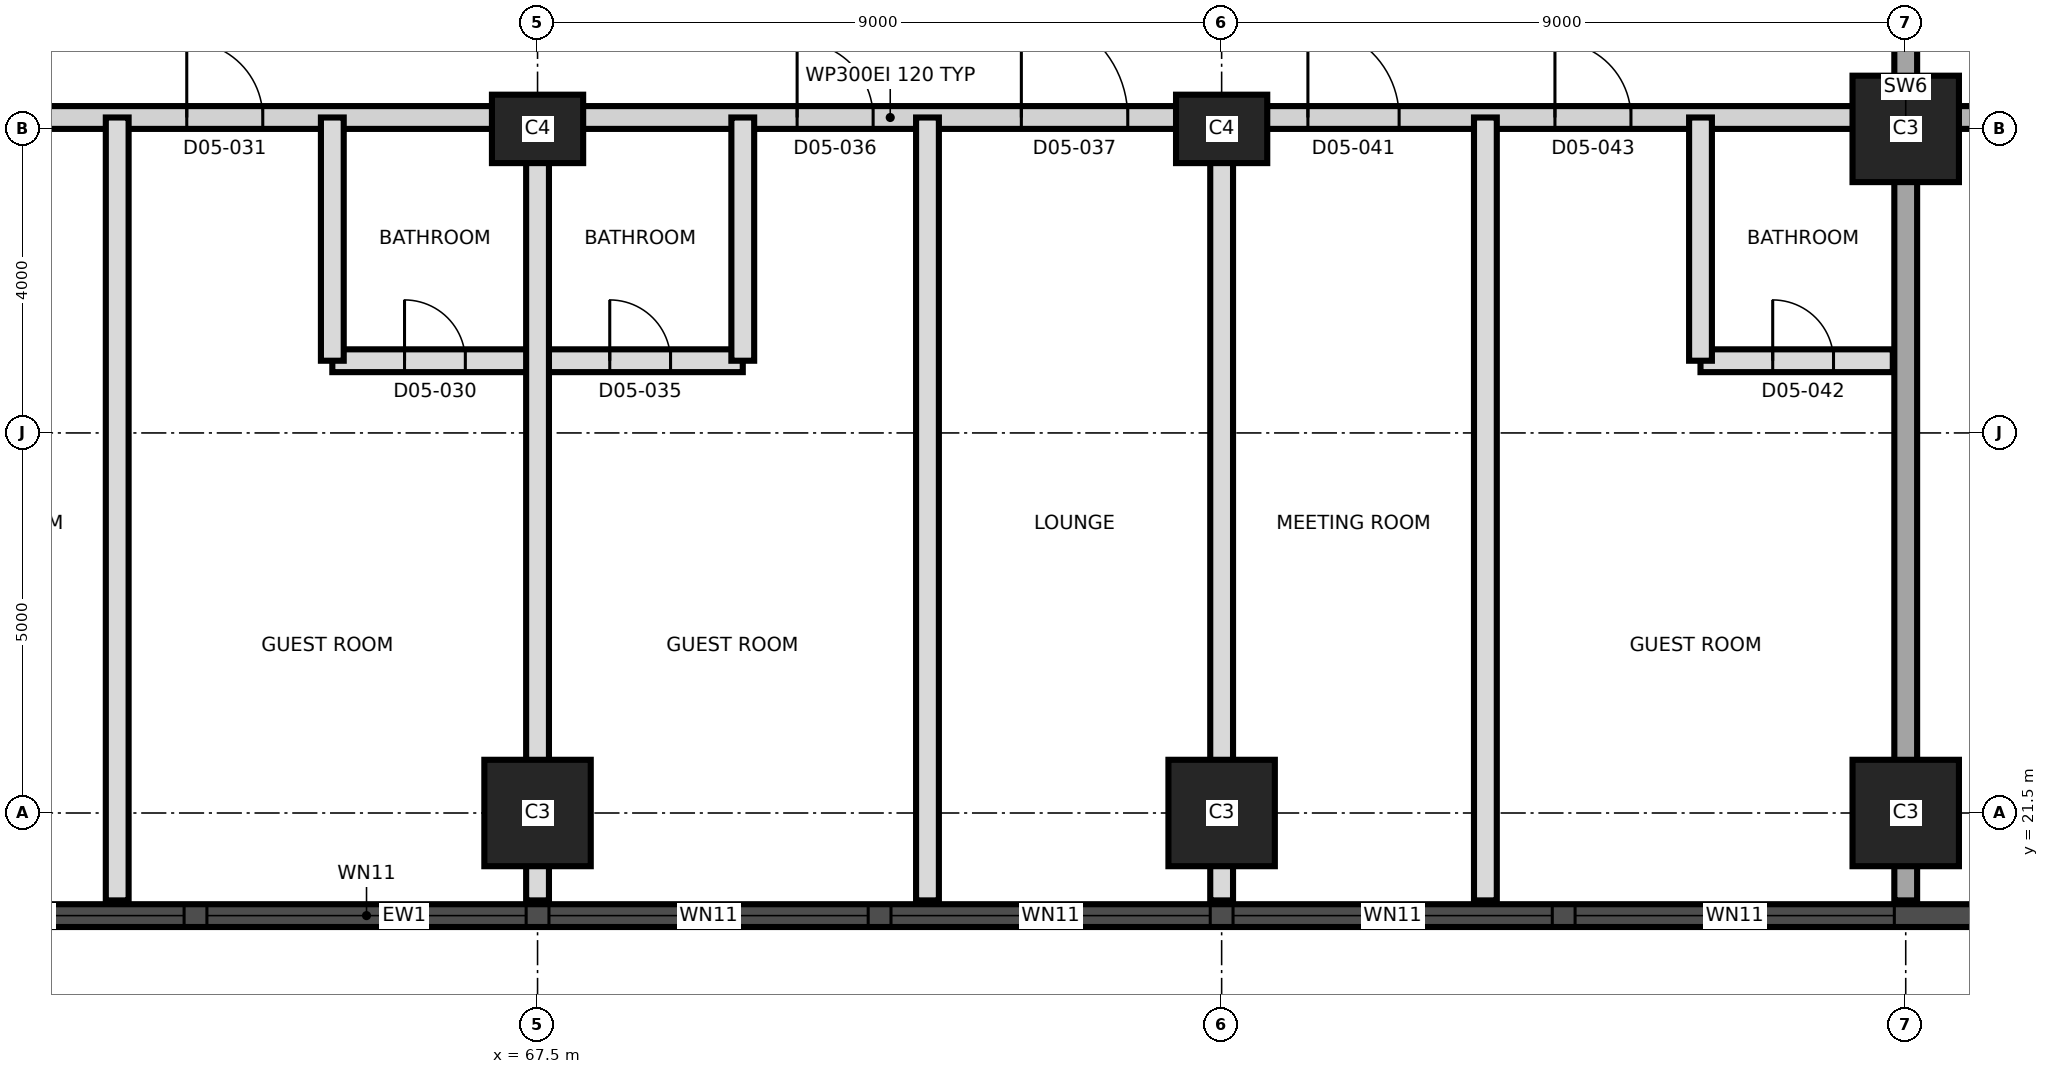
"""IFC4 building model, lengths in metres.
Left out: names, types, materials, properties, quantities, classifications, styles, units other than length and angle.
Written with IfcOpenShell. Run it as: python <this file> out.ifc"""

import sys

from ifc_helpers import new_model, si_unit, direction, frame, frame_2d, origin, origin_2d, place, context, subcontext, project, spatial, rectangle, extrude, element, fill, save


model = new_model("IFC4")
c1 = context("Model", 3, precision=1e-05, world=origin(), true_north=direction((0.0, 1.0)))
c2 = subcontext(c1, "Body", "Model", "MODEL_VIEW")
j1 = project(units=[si_unit("LENGTHUNIT", "METRE"), si_unit("PLANEANGLEUNIT", "RADIAN")], contexts=[c1])
p1 = place(None, origin())
s1 = spatial("IfcSite", under=j1, at=p1, CompositionType="ELEMENT")
p2 = place(p1, origin())
s2 = spatial("IfcBuilding", under=s1, at=p2, CompositionType="ELEMENT")
p3 = place(p2, frame((0.0, 0.0, 70.5)))
s3 = spatial("IfcBuildingStorey", under=s2, at=p3, CompositionType="ELEMENT", Elevation=70.5)
for number, where, z_axis, x_axis in (
    (1, (67.5, 21.5, 0.0), (0.0, 0.0, 1.0), (1.0, 0.0, 0.0)),
    (2, (76.5, 21.5, 0.0), (0.0, 0.0, 1.0), (1.0, 0.0, 0.0)),
    (3, (85.5, 21.5, 0.0), (0.0, 0.0, 1.0), (1.0, 0.0, 0.0)),
):
    element("IfcColumn", number, at=place(p3, frame(where, z_axis=z_axis, x_axis=x_axis)), inside=s3, PredefinedType="COLUMN", context=c2, shape_type="SweptSolid", body=[
        extrude(rectangle(XDim=1.4, YDim=1.4, at=origin_2d()), origin(), (0.0, 0.0, 1.0), 3.7),
    ])
for number, where, z_axis, x_axis in (
    (4, (67.5, 30.5, 0.0), (0.0, 0.0, 1.0), (1.0, 0.0, 0.0)),
    (5, (76.5, 30.5, 0.0), (0.0, 0.0, 1.0), (1.0, 0.0, 0.0)),
):
    element("IfcColumn", number, at=place(p3, frame(where, z_axis=z_axis, x_axis=x_axis)), inside=s3, PredefinedType="COLUMN", context=c2, shape_type="SweptSolid", body=[
        extrude(rectangle(XDim=1.2, YDim=0.9, at=origin_2d()), origin(), (0.0, 0.0, 1.0), 3.7),
    ])
p4 = place(p3, frame((85.5, 30.5, 0.0), z_axis=(0.0, 0.0, 1.0), x_axis=(1.0, 0.0, 0.0)))
e6 = element("IfcColumn", 6, at=p4, inside=s3, PredefinedType="COLUMN", context=c2, shape_type="SweptSolid", body=[
    extrude(rectangle(XDim=1.4, YDim=1.4, at=origin_2d()), origin(), (0.0, 0.0, 1.0), 3.7),
])
p5 = place(p3, frame((85.5, 20.35, 0.0), z_axis=(0.0, 0.0, 1.0), x_axis=(0.0, 1.0, 0.0)))
e7 = element("IfcWall", 7, at=p5, inside=s3, PredefinedType="SHEAR", context=c2, shape_type="SweptSolid", body=[
    extrude(rectangle(XDim=20.3, YDim=0.3, at=frame_2d((10.15, 0.0))), origin(), (0.0, 0.0, 1.0), 3.7),
])
p6 = place(p5, frame((11.35, 0.0, 0.0)))
e8 = element("IfcOpeningElement", 8, at=p6, cuts=e7, PredefinedType="OPENING", context=c2, shape_type="SweptSolid", body=[
    extrude(rectangle(XDim=1.4, YDim=2.1, at=frame_2d((0.7, 1.05))), frame((0.0, 0.16, 0.0), z_axis=(0.0, -1.0, 0.0), x_axis=(1.0, 0.0, 0.0)), (0.0, 0.0, 1.0), 0.32),
])
p7 = place(p3, frame((44.011, 20.15, 0.0), z_axis=(0.0, 0.0, 1.0), x_axis=(1.0, 0.0, 0.0)))
e9 = element("IfcWall", 9, at=p7, inside=s3, PredefinedType="SOLIDWALL", context=c2, shape_type="SweptSolid", body=[
    extrude(rectangle(XDim=43.476, YDim=0.3, at=frame_2d((21.738, 0.0))), origin(), (0.0, 0.0, 1.0), 3.4),
])
p8 = place(p7, frame((1.845, 0.0, 0.3)))
e10 = element("IfcOpeningElement", 10, at=p8, cuts=e9, PredefinedType="OPENING", context=c2, shape_type="SweptSolid", body=[
    extrude(rectangle(XDim=1.8, YDim=2.4, at=frame_2d((0.9, 1.2))), frame((0.0, 0.16, 0.0), z_axis=(0.0, -1.0, 0.0), x_axis=(1.0, 0.0, 0.0)), (0.0, 0.0, 1.0), 0.32),
])
p9 = place(p7, frame((5.639, 0.0, 0.9)))
e11 = element("IfcOpeningElement", 11, at=p9, cuts=e9, PredefinedType="OPENING", context=c2, shape_type="SweptSolid", body=[
    extrude(rectangle(XDim=4.2, YDim=1.5, at=frame_2d((2.1, 0.75))), frame((0.0, 0.16, 0.0), z_axis=(0.0, -1.0, 0.0), x_axis=(1.0, 0.0, 0.0)), (0.0, 0.0, 1.0), 0.32),
])
p10 = place(p7, frame((10.139, 0.0, 0.9)))
e12 = element("IfcOpeningElement", 12, at=p10, cuts=e9, PredefinedType="OPENING", context=c2, shape_type="SweptSolid", body=[
    extrude(rectangle(XDim=4.2, YDim=1.5, at=frame_2d((2.1, 0.75))), frame((0.0, 0.16, 0.0), z_axis=(0.0, -1.0, 0.0), x_axis=(1.0, 0.0, 0.0)), (0.0, 0.0, 1.0), 0.32),
])
p11 = place(p7, frame((14.639, 0.0, 0.9)))
e13 = element("IfcOpeningElement", 13, at=p11, cuts=e9, PredefinedType="OPENING", context=c2, shape_type="SweptSolid", body=[
    extrude(rectangle(XDim=4.2, YDim=1.5, at=frame_2d((2.1, 0.75))), frame((0.0, 0.16, 0.0), z_axis=(0.0, -1.0, 0.0), x_axis=(1.0, 0.0, 0.0)), (0.0, 0.0, 1.0), 0.32),
])
p12 = place(p7, frame((19.139, 0.0, 0.9)))
e14 = element("IfcOpeningElement", 14, at=p12, cuts=e9, PredefinedType="OPENING", context=c2, shape_type="SweptSolid", body=[
    extrude(rectangle(XDim=4.2, YDim=1.5, at=frame_2d((2.1, 0.75))), frame((0.0, 0.16, 0.0), z_axis=(0.0, -1.0, 0.0), x_axis=(1.0, 0.0, 0.0)), (0.0, 0.0, 1.0), 0.32),
])
p13 = place(p7, frame((23.639, 0.0, 0.9)))
e15 = element("IfcOpeningElement", 15, at=p13, cuts=e9, PredefinedType="OPENING", context=c2, shape_type="SweptSolid", body=[
    extrude(rectangle(XDim=4.2, YDim=1.5, at=frame_2d((2.1, 0.75))), frame((0.0, 0.16, 0.0), z_axis=(0.0, -1.0, 0.0), x_axis=(1.0, 0.0, 0.0)), (0.0, 0.0, 1.0), 0.32),
])
p14 = place(p7, frame((28.139, 0.0, 0.9)))
e16 = element("IfcOpeningElement", 16, at=p14, cuts=e9, PredefinedType="OPENING", context=c2, shape_type="SweptSolid", body=[
    extrude(rectangle(XDim=4.2, YDim=1.5, at=frame_2d((2.1, 0.75))), frame((0.0, 0.16, 0.0), z_axis=(0.0, -1.0, 0.0), x_axis=(1.0, 0.0, 0.0)), (0.0, 0.0, 1.0), 0.32),
])
p15 = place(p7, frame((32.639, 0.0, 0.9)))
e17 = element("IfcOpeningElement", 17, at=p15, cuts=e9, PredefinedType="OPENING", context=c2, shape_type="SweptSolid", body=[
    extrude(rectangle(XDim=4.2, YDim=1.5, at=frame_2d((2.1, 0.75))), frame((0.0, 0.16, 0.0), z_axis=(0.0, -1.0, 0.0), x_axis=(1.0, 0.0, 0.0)), (0.0, 0.0, 1.0), 0.32),
])
p16 = place(p7, frame((37.139, 0.0, 0.9)))
e18 = element("IfcOpeningElement", 18, at=p16, cuts=e9, PredefinedType="OPENING", context=c2, shape_type="SweptSolid", body=[
    extrude(rectangle(XDim=4.2, YDim=1.5, at=frame_2d((2.1, 0.75))), frame((0.0, 0.16, 0.0), z_axis=(0.0, -1.0, 0.0), x_axis=(1.0, 0.0, 0.0)), (0.0, 0.0, 1.0), 0.32),
])
p17 = place(p3, frame((64.8, 27.45, 0.0), z_axis=(0.0, 0.0, 1.0), x_axis=(1.0, 0.0, 0.0)))
e19 = element("IfcWall", 19, at=p17, inside=s3, PredefinedType="PARTITIONING", context=c2, shape_type="SweptSolid", body=[
    extrude(rectangle(XDim=5.4, YDim=0.3, at=frame_2d((2.7, 0.0))), origin(), (0.0, 0.0, 1.0), 3.4),
])
p18 = place(p17, frame((0.95, 0.0, 0.0)))
e20 = element("IfcOpeningElement", 20, at=p18, cuts=e19, PredefinedType="OPENING", context=c2, shape_type="SweptSolid", body=[
    extrude(rectangle(XDim=0.8, YDim=2.1, at=frame_2d((0.4, 1.05))), frame((0.0, 0.16, 0.0), z_axis=(0.0, -1.0, 0.0), x_axis=(1.0, 0.0, 0.0)), (0.0, 0.0, 1.0), 0.32),
])
p19 = place(p17, frame((3.65, 0.0, 0.0)))
e21 = element("IfcOpeningElement", 21, at=p19, cuts=e19, PredefinedType="OPENING", context=c2, shape_type="SweptSolid", body=[
    extrude(rectangle(XDim=0.8, YDim=2.1, at=frame_2d((0.4, 1.05))), frame((0.0, 0.16, 0.0), z_axis=(0.0, -1.0, 0.0), x_axis=(1.0, 0.0, 0.0)), (0.0, 0.0, 1.0), 0.32),
])
p20 = place(p3, frame((82.8, 27.45, 0.0), z_axis=(0.0, 0.0, 1.0), x_axis=(1.0, 0.0, 0.0)))
e22 = element("IfcWall", 22, at=p20, inside=s3, PredefinedType="PARTITIONING", context=c2, shape_type="SweptSolid", body=[
    extrude(rectangle(XDim=2.53, YDim=0.3, at=frame_2d((1.265, 0.0))), origin(), (0.0, 0.0, 1.0), 3.4),
])
p21 = place(p20, frame((0.95, 0.0, 0.0)))
e23 = element("IfcOpeningElement", 23, at=p21, cuts=e22, PredefinedType="OPENING", context=c2, shape_type="SweptSolid", body=[
    extrude(rectangle(XDim=0.8, YDim=2.1, at=frame_2d((0.4, 1.05))), frame((0.0, 0.16, 0.0), z_axis=(0.0, -1.0, 0.0), x_axis=(1.0, 0.0, 0.0)), (0.0, 0.0, 1.0), 0.32),
])
p22 = place(p3, frame((58.95, 30.65, 0.0), z_axis=(0.0, 0.0, 1.0), x_axis=(1.0, 0.0, 0.0)))
e24 = element("IfcWall", 24, at=p22, inside=s3, PredefinedType="PARTITIONING", context=c2, shape_type="SweptSolid", body=[
    extrude(rectangle(XDim=26.38, YDim=0.3, at=frame_2d((13.19, 0.0))), origin(), (0.0, 0.0, 1.0), 3.4),
])
p23 = place(p22, frame((0.685, 0.0, 0.0)))
e25 = element("IfcOpeningElement", 25, at=p23, cuts=e24, PredefinedType="OPENING", context=c2, shape_type="SweptSolid", body=[
    extrude(rectangle(XDim=1.2, YDim=2.1, at=frame_2d((0.6, 1.05))), frame((0.0, 0.16, 0.0), z_axis=(0.0, -1.0, 0.0), x_axis=(1.0, 0.0, 0.0)), (0.0, 0.0, 1.0), 0.32),
])
p24 = place(p22, frame((3.935, 0.0, 0.0)))
e26 = element("IfcOpeningElement", 26, at=p24, cuts=e24, PredefinedType="OPENING", context=c2, shape_type="SweptSolid", body=[
    extrude(rectangle(XDim=1.0, YDim=2.1, at=frame_2d((0.5, 1.05))), frame((0.0, 0.16, 0.0), z_axis=(0.0, -1.0, 0.0), x_axis=(1.0, 0.0, 0.0)), (0.0, 0.0, 1.0), 0.32),
])
p25 = place(p22, frame((11.965, 0.0, 0.0)))
e27 = element("IfcOpeningElement", 27, at=p25, cuts=e24, PredefinedType="OPENING", context=c2, shape_type="SweptSolid", body=[
    extrude(rectangle(XDim=1.0, YDim=2.1, at=frame_2d((0.5, 1.05))), frame((0.0, 0.16, 0.0), z_axis=(0.0, -1.0, 0.0), x_axis=(1.0, 0.0, 0.0)), (0.0, 0.0, 1.0), 0.32),
])
p26 = place(p22, frame((14.915, 0.0, 0.0)))
e28 = element("IfcOpeningElement", 28, at=p26, cuts=e24, PredefinedType="OPENING", context=c2, shape_type="SweptSolid", body=[
    extrude(rectangle(XDim=1.4, YDim=2.1, at=frame_2d((0.7, 1.05))), frame((0.0, 0.16, 0.0), z_axis=(0.0, -1.0, 0.0), x_axis=(1.0, 0.0, 0.0)), (0.0, 0.0, 1.0), 0.32),
])
p27 = place(p22, frame((18.685, 0.0, 0.0)))
e29 = element("IfcOpeningElement", 29, at=p27, cuts=e24, PredefinedType="OPENING", context=c2, shape_type="SweptSolid", body=[
    extrude(rectangle(XDim=1.2, YDim=2.1, at=frame_2d((0.6, 1.05))), frame((0.0, 0.16, 0.0), z_axis=(0.0, -1.0, 0.0), x_axis=(1.0, 0.0, 0.0)), (0.0, 0.0, 1.0), 0.32),
])
p28 = place(p22, frame((21.935, 0.0, 0.0)))
e30 = element("IfcOpeningElement", 30, at=p28, cuts=e24, PredefinedType="OPENING", context=c2, shape_type="SweptSolid", body=[
    extrude(rectangle(XDim=1.0, YDim=2.1, at=frame_2d((0.5, 1.05))), frame((0.0, 0.16, 0.0), z_axis=(0.0, -1.0, 0.0), x_axis=(1.0, 0.0, 0.0)), (0.0, 0.0, 1.0), 0.32),
])
p29 = place(p3, frame((85.67, 30.65, 0.0), z_axis=(0.0, 0.0, 1.0), x_axis=(1.0, 0.0, 0.0)))
e31 = element("IfcWall", 31, at=p29, inside=s3, PredefinedType="SHEAR", context=c2, shape_type="SweptSolid", body=[
    extrude(rectangle(XDim=9.58, YDim=0.3, at=frame_2d((4.79, 0.0))), origin(), (0.0, 0.0, 1.0), 3.4),
])
p30 = place(p29, frame((2.08, 0.0, 0.0)))
e32 = element("IfcOpeningElement", 32, at=p30, cuts=e31, PredefinedType="OPENING", context=c2, shape_type="SweptSolid", body=[
    extrude(rectangle(XDim=1.2, YDim=2.1, at=frame_2d((0.6, 1.05))), frame((0.0, 0.16, 0.0), z_axis=(0.0, -1.0, 0.0), x_axis=(1.0, 0.0, 0.0)), (0.0, 0.0, 1.0), 0.32),
])
p31 = place(p29, frame((5.63, 0.0, 0.0)))
e33 = element("IfcOpeningElement", 33, at=p31, cuts=e31, PredefinedType="OPENING", context=c2, shape_type="SweptSolid", body=[
    extrude(rectangle(XDim=1.0, YDim=2.1, at=frame_2d((0.5, 1.05))), frame((0.0, 0.16, 0.0), z_axis=(0.0, -1.0, 0.0), x_axis=(1.0, 0.0, 0.0)), (0.0, 0.0, 1.0), 0.32),
])
p32 = place(p3, frame((61.97, 20.35, 0.0), z_axis=(0.0, 0.0, 1.0), x_axis=(0.0, 1.0, 0.0)))
e34 = element("IfcWall", 34, at=p32, inside=s3, PredefinedType="PARTITIONING", context=c2, shape_type="SweptSolid", body=[
    extrude(rectangle(XDim=10.3, YDim=0.3, at=frame_2d((5.15, 0.0))), origin(), (0.0, 0.0, 1.0), 3.4),
])
p33 = place(p3, frame((64.8, 27.45, 0.0), z_axis=(0.0, 0.0, 1.0), x_axis=(0.0, 1.0, 0.0)))
e35 = element("IfcWall", 35, at=p33, inside=s3, PredefinedType="PARTITIONING", context=c2, shape_type="SweptSolid", body=[
    extrude(rectangle(XDim=3.2, YDim=0.3, at=frame_2d((1.6, 0.0))), origin(), (0.0, 0.0, 1.0), 3.4),
])
p34 = place(p3, frame((67.5, 20.35, 0.0), z_axis=(0.0, 0.0, 1.0), x_axis=(0.0, 1.0, 0.0)))
e36 = element("IfcWall", 36, at=p34, inside=s3, PredefinedType="PARTITIONING", context=c2, shape_type="SweptSolid", body=[
    extrude(rectangle(XDim=10.3, YDim=0.3, at=frame_2d((5.15, 0.0))), origin(), (0.0, 0.0, 1.0), 3.4),
])
p35 = place(p3, frame((70.2, 27.45, 0.0), z_axis=(0.0, 0.0, 1.0), x_axis=(0.0, 1.0, 0.0)))
e37 = element("IfcWall", 37, at=p35, inside=s3, PredefinedType="PARTITIONING", context=c2, shape_type="SweptSolid", body=[
    extrude(rectangle(XDim=3.2, YDim=0.3, at=frame_2d((1.6, 0.0))), origin(), (0.0, 0.0, 1.0), 3.4),
])
for number, where, z_axis, x_axis in (
    (38, (72.63, 20.35, 0.0), (0.0, 0.0, 1.0), (0.0, 1.0, 0.0)),
    (39, (76.5, 20.35, 0.0), (0.0, 0.0, 1.0), (0.0, 1.0, 0.0)),
    (40, (79.97, 20.35, 0.0), (0.0, 0.0, 1.0), (0.0, 1.0, 0.0)),
):
    element("IfcWall", number, at=place(p3, frame(where, z_axis=z_axis, x_axis=x_axis)), inside=s3, PredefinedType="PARTITIONING", context=c2, shape_type="SweptSolid", body=[
        extrude(rectangle(XDim=10.3, YDim=0.3, at=frame_2d((5.15, 0.0))), origin(), (0.0, 0.0, 1.0), 3.4),
    ])
p36 = place(p3, frame((82.8, 27.45, 0.0), z_axis=(0.0, 0.0, 1.0), x_axis=(0.0, 1.0, 0.0)))
e41 = element("IfcWall", 41, at=p36, inside=s3, PredefinedType="PARTITIONING", context=c2, shape_type="SweptSolid", body=[
    extrude(rectangle(XDim=3.2, YDim=0.3, at=frame_2d((1.6, 0.0))), origin(), (0.0, 0.0, 1.0), 3.4),
])
p37 = place(p11, origin())
e42 = element("IfcWindow", 42, at=p37, inside=s3, PartitioningType="SINGLE_PANEL", PredefinedType="WINDOW", context=c2, shape_type="SweptSolid", body=[
    extrude(rectangle(XDim=4.2, YDim=1.5, at=frame_2d((2.1, 0.75))), frame((0.0, 0.03, 0.0), z_axis=(0.0, -1.0, 0.0), x_axis=(1.0, 0.0, 0.0)), (0.0, 0.0, 1.0), 0.06),
])
fill(e13, e42)
p38 = place(p12, origin())
e43 = element("IfcWindow", 43, at=p38, inside=s3, PartitioningType="SINGLE_PANEL", PredefinedType="WINDOW", context=c2, shape_type="SweptSolid", body=[
    extrude(rectangle(XDim=4.2, YDim=1.5, at=frame_2d((2.1, 0.75))), frame((0.0, 0.03, 0.0), z_axis=(0.0, -1.0, 0.0), x_axis=(1.0, 0.0, 0.0)), (0.0, 0.0, 1.0), 0.06),
])
fill(e14, e43)
p39 = place(p13, origin())
e44 = element("IfcWindow", 44, at=p39, inside=s3, PartitioningType="SINGLE_PANEL", PredefinedType="WINDOW", context=c2, shape_type="SweptSolid", body=[
    extrude(rectangle(XDim=4.2, YDim=1.5, at=frame_2d((2.1, 0.75))), frame((0.0, 0.03, 0.0), z_axis=(0.0, -1.0, 0.0), x_axis=(1.0, 0.0, 0.0)), (0.0, 0.0, 1.0), 0.06),
])
fill(e15, e44)
p40 = place(p14, origin())
e45 = element("IfcWindow", 45, at=p40, inside=s3, PartitioningType="SINGLE_PANEL", PredefinedType="WINDOW", context=c2, shape_type="SweptSolid", body=[
    extrude(rectangle(XDim=4.2, YDim=1.5, at=frame_2d((2.1, 0.75))), frame((0.0, 0.03, 0.0), z_axis=(0.0, -1.0, 0.0), x_axis=(1.0, 0.0, 0.0)), (0.0, 0.0, 1.0), 0.06),
])
fill(e16, e45)
p41 = place(p15, origin())
e46 = element("IfcWindow", 46, at=p41, inside=s3, PartitioningType="SINGLE_PANEL", PredefinedType="WINDOW", context=c2, shape_type="SweptSolid", body=[
    extrude(rectangle(XDim=4.2, YDim=1.5, at=frame_2d((2.1, 0.75))), frame((0.0, 0.03, 0.0), z_axis=(0.0, -1.0, 0.0), x_axis=(1.0, 0.0, 0.0)), (0.0, 0.0, 1.0), 0.06),
])
fill(e17, e46)
p42 = place(p16, origin())
e47 = element("IfcWindow", 47, at=p42, inside=s3, PartitioningType="SINGLE_PANEL", PredefinedType="WINDOW", context=c2, shape_type="SweptSolid", body=[
    extrude(rectangle(XDim=4.2, YDim=1.5, at=frame_2d((2.1, 0.75))), frame((0.0, 0.03, 0.0), z_axis=(0.0, -1.0, 0.0), x_axis=(1.0, 0.0, 0.0)), (0.0, 0.0, 1.0), 0.06),
])
fill(e18, e47)
p43 = place(p18, origin())
e48 = element("IfcDoor", 48, at=p43, inside=s3, OperationType="SINGLE_SWING_RIGHT", PredefinedType="DOOR", context=c2, shape_type="SweptSolid", body=[
    extrude(rectangle(XDim=0.8, YDim=2.1, at=frame_2d((0.4, 1.05))), frame((0.0, 0.025, 0.0), z_axis=(0.0, -1.0, 0.0), x_axis=(1.0, 0.0, 0.0)), (0.0, 0.0, 1.0), 0.05),
])
fill(e20, e48)
p44 = place(p24, origin())
e49 = element("IfcDoor", 49, at=p44, inside=s3, OperationType="SINGLE_SWING_LEFT", PredefinedType="DOOR", context=c2, shape_type="SweptSolid", body=[
    extrude(rectangle(XDim=1.0, YDim=2.1, at=frame_2d((0.5, 1.05))), frame((0.0, 0.025, 0.0), z_axis=(0.0, -1.0, 0.0), x_axis=(1.0, 0.0, 0.0)), (0.0, 0.0, 1.0), 0.05),
])
fill(e26, e49)
p45 = place(p19, origin())
e50 = element("IfcDoor", 50, at=p45, inside=s3, OperationType="SINGLE_SWING_LEFT", PredefinedType="DOOR", context=c2, shape_type="SweptSolid", body=[
    extrude(rectangle(XDim=0.8, YDim=2.1, at=frame_2d((0.4, 1.05))), frame((0.0, 0.025, 0.0), z_axis=(0.0, -1.0, 0.0), x_axis=(1.0, 0.0, 0.0)), (0.0, 0.0, 1.0), 0.05),
])
fill(e21, e50)
p46 = place(p25, origin())
e51 = element("IfcDoor", 51, at=p46, inside=s3, OperationType="SINGLE_SWING_LEFT", PredefinedType="DOOR", context=c2, shape_type="SweptSolid", body=[
    extrude(rectangle(XDim=1.0, YDim=2.1, at=frame_2d((0.5, 1.05))), frame((0.0, 0.025, 0.0), z_axis=(0.0, -1.0, 0.0), x_axis=(1.0, 0.0, 0.0)), (0.0, 0.0, 1.0), 0.05),
])
fill(e27, e51)
p47 = place(p26, origin())
e52 = element("IfcDoor", 52, at=p47, inside=s3, OperationType="SINGLE_SWING_RIGHT", PredefinedType="DOOR", context=c2, shape_type="SweptSolid", body=[
    extrude(rectangle(XDim=1.4, YDim=2.1, at=frame_2d((0.7, 1.05))), frame((0.0, 0.025, 0.0), z_axis=(0.0, -1.0, 0.0), x_axis=(1.0, 0.0, 0.0)), (0.0, 0.0, 1.0), 0.05),
])
fill(e28, e52)
p48 = place(p27, origin())
e53 = element("IfcDoor", 53, at=p48, inside=s3, OperationType="SINGLE_SWING_LEFT", PredefinedType="DOOR", context=c2, shape_type="SweptSolid", body=[
    extrude(rectangle(XDim=1.2, YDim=2.1, at=frame_2d((0.6, 1.05))), frame((0.0, 0.025, 0.0), z_axis=(0.0, -1.0, 0.0), x_axis=(1.0, 0.0, 0.0)), (0.0, 0.0, 1.0), 0.05),
])
fill(e29, e53)
p49 = place(p21, origin())
e54 = element("IfcDoor", 54, at=p49, inside=s3, OperationType="SINGLE_SWING_RIGHT", PredefinedType="DOOR", context=c2, shape_type="SweptSolid", body=[
    extrude(rectangle(XDim=0.8, YDim=2.1, at=frame_2d((0.4, 1.05))), frame((0.0, 0.025, 0.0), z_axis=(0.0, -1.0, 0.0), x_axis=(1.0, 0.0, 0.0)), (0.0, 0.0, 1.0), 0.05),
])
fill(e23, e54)
p50 = place(p28, origin())
e55 = element("IfcDoor", 55, at=p50, inside=s3, OperationType="SINGLE_SWING_LEFT", PredefinedType="DOOR", context=c2, shape_type="SweptSolid", body=[
    extrude(rectangle(XDim=1.0, YDim=2.1, at=frame_2d((0.5, 1.05))), frame((0.0, 0.025, 0.0), z_axis=(0.0, -1.0, 0.0), x_axis=(1.0, 0.0, 0.0)), (0.0, 0.0, 1.0), 0.05),
])
fill(e30, e55)
save(model, sys.argv[1])
